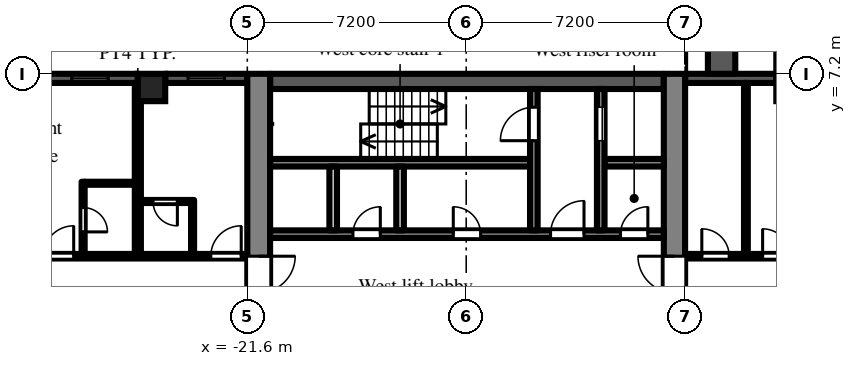
"""IFC4 building model, lengths in metres.
Left out: names, types, materials, properties, quantities, classifications, styles, units other than length and angle.
Written with IfcOpenShell. Run it as: python <this file> out.ifc"""

import sys

from ifc_helpers import new_model, si_unit, direction, frame, frame_2d, origin, origin_2d, place, context, subcontext, project, spatial, rectangle, extrude, element, fill, save


model = new_model("IFC4")
c1 = context("Model", 3, precision=1e-05, world=origin(), true_north=direction((0.0, 1.0)))
c2 = subcontext(c1, "Body", "Model", "MODEL_VIEW")
j1 = project(units=[si_unit("LENGTHUNIT", "METRE"), si_unit("PLANEANGLEUNIT", "RADIAN")], contexts=[c1])
p1 = place(None, origin())
s1 = spatial("IfcSite", under=j1, at=p1, CompositionType="ELEMENT")
p2 = place(p1, origin())
s2 = spatial("IfcBuilding", under=s1, at=p2, CompositionType="ELEMENT")
p3 = place(p2, frame((0.0, 0.0, 53.7)))
s3 = spatial("IfcBuildingStorey", under=s2, at=p3, CompositionType="ELEMENT", Elevation=53.7)
p4 = place(p3, frame((-24.75, 6.75, 0.0), z_axis=(0.0, 0.0, 1.0), x_axis=(1.0, 0.0, 0.0)))
e1 = element("IfcColumn", 1, at=p4, inside=s3, PredefinedType="COLUMN", context=c2, shape_type="SweptSolid", body=[
    extrude(rectangle(XDim=0.9, YDim=0.9, at=origin_2d()), origin(), (0.0, 0.0, 1.0), 3.0),
])
p5 = place(p3, frame((-4.05, 14.4, 0.0), z_axis=(0.0, 0.0, 1.0), x_axis=(0.0, -1.0, 0.0)))
e2 = element("IfcWall", 2, at=p5, inside=s3, PredefinedType="SOLIDWALL", context=c2, shape_type="SweptSolid", body=[
    extrude(rectangle(XDim=7.2, YDim=0.3, at=frame_2d((3.6, 0.0))), origin(), (0.0, 0.0, 1.0), 2.1),
])
p6 = place(p5, frame((3.0, 0.0, 0.0)))
e3 = element("IfcOpeningElement", 3, at=p6, cuts=e2, PredefinedType="OPENING", context=c2, shape_type="SweptSolid", body=[
    extrude(rectangle(XDim=1.2, YDim=2.05, at=frame_2d((0.6, 1.025))), frame((0.0, 0.16, 0.0), z_axis=(0.0, -1.0, 0.0), x_axis=(1.0, 0.0, 0.0)), (0.0, 0.0, 1.0), 0.32),
])
p7 = place(p5, frame((0.9, 0.0, 0.2)))
e4 = element("IfcOpeningElement", 4, at=p7, cuts=e2, PredefinedType="OPENING", context=c2, shape_type="SweptSolid", body=[
    extrude(rectangle(XDim=1.8, YDim=1.85, at=frame_2d((0.9, 0.925))), frame((0.0, 0.16, 0.0), z_axis=(0.0, -1.0, 0.0), x_axis=(1.0, 0.0, 0.0)), (0.0, 0.0, 1.0), 0.32),
])
p8 = place(p5, frame((4.5, 0.0, 0.2)))
e5 = element("IfcOpeningElement", 5, at=p8, cuts=e2, PredefinedType="OPENING", context=c2, shape_type="SweptSolid", body=[
    extrude(rectangle(XDim=1.8, YDim=1.85, at=frame_2d((0.9, 0.925))), frame((0.0, 0.16, 0.0), z_axis=(0.0, -1.0, 0.0), x_axis=(1.0, 0.0, 0.0)), (0.0, 0.0, 1.0), 0.32),
])
p9 = place(p3, frame((-4.2, 7.05, 0.0), z_axis=(0.0, 0.0, 1.0), x_axis=(-1.0, 0.0, 0.0)))
e6 = element("IfcWall", 6, at=p9, inside=s3, PredefinedType="SOLIDWALL", context=c2, shape_type="SweptSolid", body=[
    extrude(rectangle(XDim=3.0, YDim=0.3, at=frame_2d((1.5, 0.0))), origin(), (0.0, 0.0, 1.0), 2.1),
])
p10 = place(p3, frame((-21.6, 7.05, 0.0), z_axis=(0.0, 0.0, 1.0), x_axis=(-1.0, 0.0, 0.0)))
e7 = element("IfcWall", 7, at=p10, inside=s3, PredefinedType="SOLIDWALL", context=c2, shape_type="SweptSolid", body=[
    extrude(rectangle(XDim=2.7, YDim=0.3, at=frame_2d((1.35, 0.0))), origin(), (0.0, 0.0, 1.0), 2.1),
])
p11 = place(p10, frame((0.75, 0.0, 0.2)))
e8 = element("IfcOpeningElement", 8, at=p11, cuts=e7, PredefinedType="OPENING", context=c2, shape_type="SweptSolid", body=[
    extrude(rectangle(XDim=1.2, YDim=1.85, at=frame_2d((0.6, 0.925))), frame((0.0, 0.16, 0.0), z_axis=(0.0, -1.0, 0.0), x_axis=(1.0, 0.0, 0.0)), (0.0, 0.0, 1.0), 0.32),
])
p12 = place(p3, frame((-25.2, 7.05, 0.0), z_axis=(0.0, 0.0, 1.0), x_axis=(-1.0, 0.0, 0.0)))
e9 = element("IfcWall", 9, at=p12, inside=s3, PredefinedType="SOLIDWALL", context=c2, shape_type="SweptSolid", body=[
    extrude(rectangle(XDim=3.15, YDim=0.3, at=frame_2d((1.575, 0.0))), origin(), (0.0, 0.0, 1.0), 2.1),
])
p13 = place(p12, frame((0.975, 0.0, 0.2)))
e10 = element("IfcOpeningElement", 10, at=p13, cuts=e9, PredefinedType="OPENING", context=c2, shape_type="SweptSolid", body=[
    extrude(rectangle(XDim=1.2, YDim=1.85, at=frame_2d((0.6, 0.925))), frame((0.0, 0.16, 0.0), z_axis=(0.0, -1.0, 0.0), x_axis=(1.0, 0.0, 0.0)), (0.0, 0.0, 1.0), 0.32),
])
p14 = place(p3, frame((-6.0, 7.2, 0.0), z_axis=(0.0, 0.0, 1.0), x_axis=(0.0, 1.0, 0.0)))
e11 = element("IfcWall", 11, at=p14, inside=s3, PredefinedType="PARAPET", context=c2, shape_type="SweptSolid", body=[
    extrude(rectangle(XDim=7.2, YDim=0.9, at=frame_2d((3.6, 0.0))), origin(), (0.0, 0.0, 1.0), 0.8),
])
p15 = place(p3, frame((-7.55, -7.2, 0.0), z_axis=(0.0, 0.0, 1.0), x_axis=(0.0, 1.0, 0.0)))
e12 = element("IfcWall", 12, at=p15, inside=s3, PredefinedType="SHEAR", context=c2, shape_type="SweptSolid", body=[
    extrude(rectangle(XDim=14.4, YDim=0.7, at=frame_2d((7.2, 0.0))), origin(), (0.0, 0.0, 1.0), 2.575),
])
p16 = place(p15, frame((6.0, 0.0, 0.0)))
e13 = element("IfcOpeningElement", 13, at=p16, cuts=e12, PredefinedType="OPENING", context=c2, shape_type="SweptSolid", body=[
    extrude(rectangle(XDim=2.4, YDim=2.2, at=frame_2d((1.2, 1.1))), frame((0.0, 0.36, 0.0), z_axis=(0.0, -1.0, 0.0), x_axis=(1.0, 0.0, 0.0)), (0.0, 0.0, 1.0), 0.72),
])
p17 = place(p3, frame((-21.225, -7.2, 0.0), z_axis=(0.0, 0.0, 1.0), x_axis=(0.0, 1.0, 0.0)))
e14 = element("IfcWall", 14, at=p17, inside=s3, PredefinedType="SHEAR", context=c2, shape_type="SweptSolid", body=[
    extrude(rectangle(XDim=14.4, YDim=0.75, at=frame_2d((7.2, 0.0))), origin(), (0.0, 0.0, 1.0), 2.575),
])
p18 = place(p17, frame((6.0, 0.0, 0.0)))
e15 = element("IfcOpeningElement", 15, at=p18, cuts=e14, PredefinedType="OPENING", context=c2, shape_type="SweptSolid", body=[
    extrude(rectangle(XDim=2.4, YDim=2.2, at=frame_2d((1.2, 1.1))), frame((0.0, 0.385, 0.0), z_axis=(0.0, -1.0, 0.0), x_axis=(1.0, 0.0, 0.0)), (0.0, 0.0, 1.0), 0.77),
])
p19 = place(p3, frame((-7.9, 6.95, 0.0), z_axis=(0.0, 0.0, 1.0), x_axis=(-1.0, 0.0, 0.0)))
e16 = element("IfcWall", 16, at=p19, inside=s3, PredefinedType="SHEAR", context=c2, shape_type="SweptSolid", body=[
    extrude(rectangle(XDim=12.95, YDim=0.5, at=frame_2d((6.475, 0.0))), origin(), (0.0, 0.0, 1.0), 2.575),
])
p20 = place(p3, frame((-7.9, 1.925, 0.0), z_axis=(0.0, 0.0, 1.0), x_axis=(-1.0, 0.0, 0.0)))
e17 = element("IfcWall", 17, at=p20, inside=s3, PredefinedType="SHEAR", context=c2, shape_type="SweptSolid", body=[
    extrude(rectangle(XDim=12.95, YDim=0.25, at=frame_2d((6.475, 0.0))), origin(), (0.0, 0.0, 1.0), 2.575),
])
p21 = place(p20, frame((0.525, 0.0, 0.0)))
e18 = element("IfcOpeningElement", 18, at=p21, cuts=e17, PredefinedType="OPENING", context=c2, shape_type="SweptSolid", body=[
    extrude(rectangle(XDim=0.9, YDim=2.1, at=frame_2d((0.45, 1.05))), frame((0.0, 0.135, 0.0), z_axis=(0.0, -1.0, 0.0), x_axis=(1.0, 0.0, 0.0)), (0.0, 0.0, 1.0), 0.27),
])
p22 = place(p20, frame((2.625, 0.0, 0.0)))
e19 = element("IfcOpeningElement", 19, at=p22, cuts=e17, PredefinedType="OPENING", context=c2, shape_type="SweptSolid", body=[
    extrude(rectangle(XDim=1.1, YDim=2.1, at=frame_2d((0.55, 1.05))), frame((0.0, 0.135, 0.0), z_axis=(0.0, -1.0, 0.0), x_axis=(1.0, 0.0, 0.0)), (0.0, 0.0, 1.0), 0.27),
])
p23 = place(p20, frame((6.025, 0.0, 0.0)))
e20 = element("IfcOpeningElement", 20, at=p23, cuts=e17, PredefinedType="OPENING", context=c2, shape_type="SweptSolid", body=[
    extrude(rectangle(XDim=0.9, YDim=2.1, at=frame_2d((0.45, 1.05))), frame((0.0, 0.135, 0.0), z_axis=(0.0, -1.0, 0.0), x_axis=(1.0, 0.0, 0.0)), (0.0, 0.0, 1.0), 0.27),
])
p24 = place(p20, frame((9.325, 0.0, 0.0)))
e21 = element("IfcOpeningElement", 21, at=p24, cuts=e17, PredefinedType="OPENING", context=c2, shape_type="SweptSolid", body=[
    extrude(rectangle(XDim=0.9, YDim=2.1, at=frame_2d((0.45, 1.05))), frame((0.0, 0.135, 0.0), z_axis=(0.0, -1.0, 0.0), x_axis=(1.0, 0.0, 0.0)), (0.0, 0.0, 1.0), 0.27),
])
p25 = place(p3, frame((-7.9, 4.275, 0.0), z_axis=(0.0, 0.0, 1.0), x_axis=(-1.0, 0.0, 0.0)))
e22 = element("IfcWall", 22, at=p25, inside=s3, PredefinedType="SHEAR", context=c2, shape_type="SweptSolid", body=[
    extrude(rectangle(XDim=1.95, YDim=0.25, at=frame_2d((0.975, 0.0))), origin(), (0.0, 0.0, 1.0), 2.575),
])
p26 = place(p3, frame((-12.3, 4.275, 0.0), z_axis=(0.0, 0.0, 1.0), x_axis=(-1.0, 0.0, 0.0)))
e23 = element("IfcWall", 23, at=p26, inside=s3, PredefinedType="SHEAR", context=c2, shape_type="SweptSolid", body=[
    extrude(rectangle(XDim=8.55, YDim=0.25, at=frame_2d((4.275, 0.0))), origin(), (0.0, 0.0, 1.0), 2.575),
])
p27 = place(p3, frame((-9.975, 2.05, 0.0), z_axis=(0.0, 0.0, 1.0), x_axis=(0.0, 1.0, 0.0)))
e24 = element("IfcWall", 24, at=p27, inside=s3, PredefinedType="SHEAR", context=c2, shape_type="SweptSolid", body=[
    extrude(rectangle(XDim=4.65, YDim=0.25, at=frame_2d((2.325, 0.0))), origin(), (0.0, 0.0, 1.0), 2.575),
])
p28 = place(p27, frame((2.95, 0.0, 0.0)))
e25 = element("IfcOpeningElement", 25, at=p28, cuts=e24, PredefinedType="OPENING", context=c2, shape_type="SweptSolid", body=[
    extrude(rectangle(XDim=1.1, YDim=2.1, at=frame_2d((0.55, 1.05))), frame((0.0, 0.135, 0.0), z_axis=(0.0, -1.0, 0.0), x_axis=(1.0, 0.0, 0.0)), (0.0, 0.0, 1.0), 0.27),
])
p29 = place(p3, frame((-12.175, 2.05, 0.0), z_axis=(0.0, 0.0, 1.0), x_axis=(0.0, 1.0, 0.0)))
e26 = element("IfcWall", 26, at=p29, inside=s3, PredefinedType="SHEAR", context=c2, shape_type="SweptSolid", body=[
    extrude(rectangle(XDim=4.65, YDim=0.25, at=frame_2d((2.325, 0.0))), origin(), (0.0, 0.0, 1.0), 2.575),
])
p30 = place(p29, frame((2.95, 0.0, 0.0)))
e27 = element("IfcOpeningElement", 27, at=p30, cuts=e26, PredefinedType="OPENING", context=c2, shape_type="SweptSolid", body=[
    extrude(rectangle(XDim=1.1, YDim=2.1, at=frame_2d((0.55, 1.05))), frame((0.0, 0.135, 0.0), z_axis=(0.0, -1.0, 0.0), x_axis=(1.0, 0.0, 0.0)), (0.0, 0.0, 1.0), 0.27),
])
for number, where, z_axis, x_axis in (
    (28, (-16.575, 2.05, 0.0), (0.0, 0.0, 1.0), (0.0, 1.0, 0.0)),
    (29, (-18.775, 2.05, 0.0), (0.0, 0.0, 1.0), (0.0, 1.0, 0.0)),
):
    element("IfcWall", number, at=place(p3, frame(where, z_axis=z_axis, x_axis=x_axis)), inside=s3, PredefinedType="PARTITIONING", context=c2, shape_type="SweptSolid", body=[
        extrude(rectangle(XDim=2.1, YDim=0.25, at=frame_2d((1.05, 0.0))), origin(), (0.0, 0.0, 1.0), 2.575),
    ])
p31 = place(p3, frame((-36.5, 1.2, 0.0), z_axis=(0.0, 0.0, 1.0), x_axis=(1.0, 0.0, 0.0)))
e30 = element("IfcWall", 30, at=p31, inside=s3, PredefinedType="PARTITIONING", context=c2, shape_type="SweptSolid", body=[
    extrude(rectangle(XDim=14.9, YDim=0.15, at=frame_2d((7.45, 0.0))), origin(), (0.0, 0.0, 1.0), 2.575),
])
p32 = place(p31, frame((13.7, 0.0, 0.0)))
e31 = element("IfcOpeningElement", 31, at=p32, cuts=e30, PredefinedType="OPENING", context=c2, shape_type="SweptSolid", body=[
    extrude(rectangle(XDim=1.0, YDim=2.1, at=frame_2d((0.5, 1.05))), frame((0.0, 0.085, 0.0), z_axis=(0.0, -1.0, 0.0), x_axis=(1.0, 0.0, 0.0)), (0.0, 0.0, 1.0), 0.17),
])
p33 = place(p31, frame((8.19, 0.0, 0.0)))
e32 = element("IfcOpeningElement", 32, at=p33, cuts=e30, PredefinedType="OPENING", context=c2, shape_type="SweptSolid", body=[
    extrude(rectangle(XDim=1.0, YDim=2.1, at=frame_2d((0.5, 1.05))), frame((0.0, 0.085, 0.0), z_axis=(0.0, -1.0, 0.0), x_axis=(1.0, 0.0, 0.0)), (0.0, 0.0, 1.0), 0.17),
])
p34 = place(p31, frame((1.15, 0.0, 0.0)))
e33 = element("IfcOpeningElement", 33, at=p34, cuts=e30, PredefinedType="OPENING", context=c2, shape_type="SweptSolid", body=[
    extrude(rectangle(XDim=1.8, YDim=2.1, at=frame_2d((0.9, 1.05))), frame((0.0, 0.085, 0.0), z_axis=(0.0, -1.0, 0.0), x_axis=(1.0, 0.0, 0.0)), (0.0, 0.0, 1.0), 0.17),
])
p35 = place(p3, frame((-27.0, 1.275, 0.0), z_axis=(0.0, 0.0, 1.0), x_axis=(0.0, 1.0, 0.0)))
e34 = element("IfcWall", 34, at=p35, inside=s3, PredefinedType="PARTITIONING", context=c2, shape_type="SweptSolid", body=[
    extrude(rectangle(XDim=2.375, YDim=0.1, at=frame_2d((1.188, 0.0))), origin(), (0.0, 0.0, 1.0), 2.575),
])
p36 = place(p35, frame((0.725, 0.0, 0.0)))
e35 = element("IfcOpeningElement", 35, at=p36, cuts=e34, PredefinedType="OPENING", context=c2, shape_type="SweptSolid", body=[
    extrude(rectangle(XDim=0.8, YDim=2.1, at=frame_2d((0.4, 1.05))), frame((0.0, 0.06, 0.0), z_axis=(0.0, -1.0, 0.0), x_axis=(1.0, 0.0, 0.0)), (0.0, 0.0, 1.0), 0.12),
])
p37 = place(p3, frame((-26.95, 3.6, 0.0), z_axis=(0.0, 0.0, 1.0), x_axis=(1.0, 0.0, 0.0)))
e36 = element("IfcWall", 36, at=p37, inside=s3, PredefinedType="PARTITIONING", context=c2, shape_type="SweptSolid", body=[
    extrude(rectangle(XDim=1.65, YDim=0.1, at=frame_2d((0.825, 0.0))), origin(), (0.0, 0.0, 1.0), 2.575),
])
p38 = place(p3, frame((-25.2, 1.275, 0.0), z_axis=(0.0, 0.0, 1.0), x_axis=(0.0, 1.0, 0.0)))
e37 = element("IfcWall", 37, at=p38, inside=s3, PredefinedType="PARTITIONING", context=c2, shape_type="SweptSolid", body=[
    extrude(rectangle(XDim=5.625, YDim=0.2, at=frame_2d((2.812, 0.0))), origin(), (0.0, 0.0, 1.0), 2.575),
])
p39 = place(p3, frame((-25.1, 3.0, 0.0), z_axis=(0.0, 0.0, 1.0), x_axis=(1.0, 0.0, 0.0)))
e38 = element("IfcWall", 38, at=p39, inside=s3, PredefinedType="PARTITIONING", context=c2, shape_type="SweptSolid", body=[
    extrude(rectangle(XDim=1.75, YDim=0.1, at=frame_2d((0.875, 0.0))), origin(), (0.0, 0.0, 1.0), 2.575),
])
p40 = place(p39, frame((0.4, 0.0, 0.0)))
e39 = element("IfcOpeningElement", 39, at=p40, cuts=e38, PredefinedType="OPENING", context=c2, shape_type="SweptSolid", body=[
    extrude(rectangle(XDim=0.8, YDim=2.1, at=frame_2d((0.4, 1.05))), frame((0.0, 0.06, 0.0), z_axis=(0.0, -1.0, 0.0), x_axis=(1.0, 0.0, 0.0)), (0.0, 0.0, 1.0), 0.12),
])
p41 = place(p3, frame((-23.4, 1.275, 0.0), z_axis=(0.0, 0.0, 1.0), x_axis=(0.0, 1.0, 0.0)))
e40 = element("IfcWall", 40, at=p41, inside=s3, PredefinedType="PARTITIONING", context=c2, shape_type="SweptSolid", body=[
    extrude(rectangle(XDim=1.675, YDim=0.1, at=frame_2d((0.837, 0.0))), origin(), (0.0, 0.0, 1.0), 2.575),
])
p42 = place(p3, frame((-7.2, 1.2, 0.0), z_axis=(0.0, 0.0, 1.0), x_axis=(1.0, 0.0, 0.0)))
e41 = element("IfcWall", 41, at=p42, inside=s3, PredefinedType="PARTITIONING", context=c2, shape_type="SweptSolid", body=[
    extrude(rectangle(XDim=6.075, YDim=0.15, at=frame_2d((3.038, 0.0))), origin(), (0.0, 0.0, 1.0), 2.575),
])
p43 = place(p42, frame((2.55, 0.0, 0.0)))
e42 = element("IfcOpeningElement", 42, at=p43, cuts=e41, PredefinedType="OPENING", context=c2, shape_type="SweptSolid", body=[
    extrude(rectangle(XDim=0.9, YDim=2.1, at=frame_2d((0.45, 1.05))), frame((0.0, 0.085, 0.0), z_axis=(0.0, -1.0, 0.0), x_axis=(1.0, 0.0, 0.0)), (0.0, 0.0, 1.0), 0.17),
])
p44 = place(p42, frame((0.55, 0.0, 0.0)))
e43 = element("IfcOpeningElement", 43, at=p44, cuts=e41, PredefinedType="OPENING", context=c2, shape_type="SweptSolid", body=[
    extrude(rectangle(XDim=0.9, YDim=2.1, at=frame_2d((0.45, 1.05))), frame((0.0, 0.085, 0.0), z_axis=(0.0, -1.0, 0.0), x_axis=(1.0, 0.0, 0.0)), (0.0, 0.0, 1.0), 0.17),
])
p45 = place(p3, frame((-5.2, 1.275, 0.0), z_axis=(0.0, 0.0, 1.0), x_axis=(0.0, 1.0, 0.0)))
e44 = element("IfcWall", 44, at=p45, inside=s3, PredefinedType="PARTITIONING", context=c2, shape_type="SweptSolid", body=[
    extrude(rectangle(XDim=5.625, YDim=0.125, at=frame_2d((2.812, 0.0))), origin(), (0.0, 0.0, 1.0), 2.575),
])
p46 = place(p11, origin())
e45 = element("IfcWindow", 45, at=p46, inside=s3, PartitioningType="SINGLE_PANEL", PredefinedType="WINDOW", context=c2, shape_type="SweptSolid", body=[
    extrude(rectangle(XDim=1.2, YDim=1.85, at=frame_2d((0.6, 0.925))), frame((0.0, 0.03, 0.0), z_axis=(0.0, -1.0, 0.0), x_axis=(1.0, 0.0, 0.0)), (0.0, 0.0, 1.0), 0.06),
])
fill(e8, e45)
p47 = place(p13, origin())
e46 = element("IfcWindow", 46, at=p47, inside=s3, PartitioningType="SINGLE_PANEL", PredefinedType="WINDOW", context=c2, shape_type="SweptSolid", body=[
    extrude(rectangle(XDim=1.2, YDim=1.85, at=frame_2d((0.6, 0.925))), frame((0.0, 0.03, 0.0), z_axis=(0.0, -1.0, 0.0), x_axis=(1.0, 0.0, 0.0)), (0.0, 0.0, 1.0), 0.06),
])
fill(e10, e46)
p48 = place(p28, origin())
e47 = element("IfcDoor", 47, at=p48, inside=s3, OperationType="SLIDING_TO_LEFT", PredefinedType="DOOR", context=c2, shape_type="SweptSolid", body=[
    extrude(rectangle(XDim=1.1, YDim=2.1, at=frame_2d((0.55, 1.05))), frame((0.0, 0.025, 0.0), z_axis=(0.0, -1.0, 0.0), x_axis=(1.0, 0.0, 0.0)), (0.0, 0.0, 1.0), 0.05),
])
fill(e25, e47)
p49 = place(p30, origin())
e48 = element("IfcDoor", 48, at=p49, inside=s3, OperationType="SINGLE_SWING_LEFT", PredefinedType="DOOR", context=c2, shape_type="SweptSolid", body=[
    extrude(rectangle(XDim=1.1, YDim=2.1, at=frame_2d((0.55, 1.05))), frame((0.0, 0.025, 0.0), z_axis=(0.0, -1.0, 0.0), x_axis=(1.0, 0.0, 0.0)), (0.0, 0.0, 1.0), 0.05),
])
fill(e27, e48)
p50 = place(p21, frame((0.9, 0.0, 0.0), z_axis=(0.0, 0.0, 1.0), x_axis=(-1.0, 0.0, 0.0)))
e49 = element("IfcDoor", 49, at=p50, inside=s3, OperationType="SINGLE_SWING_RIGHT", PredefinedType="DOOR", context=c2, shape_type="SweptSolid", body=[
    extrude(rectangle(XDim=0.9, YDim=2.1, at=frame_2d((0.45, 1.05))), frame((0.0, 0.025, 0.0), z_axis=(0.0, -1.0, 0.0), x_axis=(1.0, 0.0, 0.0)), (0.0, 0.0, 1.0), 0.05),
])
fill(e18, e49)
p51 = place(p22, frame((1.1, 0.0, 0.0), z_axis=(0.0, 0.0, 1.0), x_axis=(-1.0, 0.0, 0.0)))
e50 = element("IfcDoor", 50, at=p51, inside=s3, OperationType="SINGLE_SWING_RIGHT", PredefinedType="DOOR", context=c2, shape_type="SweptSolid", body=[
    extrude(rectangle(XDim=1.1, YDim=2.1, at=frame_2d((0.55, 1.05))), frame((0.0, 0.025, 0.0), z_axis=(0.0, -1.0, 0.0), x_axis=(1.0, 0.0, 0.0)), (0.0, 0.0, 1.0), 0.05),
])
fill(e19, e50)
p52 = place(p16, origin())
e51 = element("IfcDoor", 51, at=p52, inside=s3, OperationType="DOUBLE_DOOR_DOUBLE_SWING", PredefinedType="DOOR", context=c2, shape_type="SweptSolid", body=[
    extrude(rectangle(XDim=2.4, YDim=2.2, at=frame_2d((1.2, 1.1))), frame((0.0, 0.025, 0.0), z_axis=(0.0, -1.0, 0.0), x_axis=(1.0, 0.0, 0.0)), (0.0, 0.0, 1.0), 0.05),
])
fill(e13, e51)
p53 = place(p18, frame((2.4, 0.0, 0.0), z_axis=(0.0, 0.0, 1.0), x_axis=(-1.0, 0.0, 0.0)))
e52 = element("IfcDoor", 52, at=p53, inside=s3, OperationType="DOUBLE_DOOR_DOUBLE_SWING", PredefinedType="DOOR", context=c2, shape_type="SweptSolid", body=[
    extrude(rectangle(XDim=2.4, YDim=2.2, at=frame_2d((1.2, 1.1))), frame((0.0, 0.025, 0.0), z_axis=(0.0, -1.0, 0.0), x_axis=(1.0, 0.0, 0.0)), (0.0, 0.0, 1.0), 0.05),
])
fill(e15, e52)
p54 = place(p23, frame((0.9, 0.0, 0.0), z_axis=(0.0, 0.0, 1.0), x_axis=(-1.0, 0.0, 0.0)))
e53 = element("IfcDoor", 53, at=p54, inside=s3, OperationType="SINGLE_SWING_LEFT", PredefinedType="DOOR", context=c2, shape_type="SweptSolid", body=[
    extrude(rectangle(XDim=0.9, YDim=2.1, at=frame_2d((0.45, 1.05))), frame((0.0, 0.025, 0.0), z_axis=(0.0, -1.0, 0.0), x_axis=(1.0, 0.0, 0.0)), (0.0, 0.0, 1.0), 0.05),
])
fill(e20, e53)
p55 = place(p24, frame((0.9, 0.0, 0.0), z_axis=(0.0, 0.0, 1.0), x_axis=(-1.0, 0.0, 0.0)))
e54 = element("IfcDoor", 54, at=p55, inside=s3, OperationType="SINGLE_SWING_RIGHT", PredefinedType="DOOR", context=c2, shape_type="SweptSolid", body=[
    extrude(rectangle(XDim=0.9, YDim=2.1, at=frame_2d((0.45, 1.05))), frame((0.0, 0.025, 0.0), z_axis=(0.0, -1.0, 0.0), x_axis=(1.0, 0.0, 0.0)), (0.0, 0.0, 1.0), 0.05),
])
fill(e21, e54)
p56 = place(p43, origin())
e55 = element("IfcDoor", 55, at=p56, inside=s3, OperationType="SINGLE_SWING_LEFT", PredefinedType="DOOR", context=c2, shape_type="SweptSolid", body=[
    extrude(rectangle(XDim=0.9, YDim=2.1, at=frame_2d((0.45, 1.05))), frame((0.0, 0.025, 0.0), z_axis=(0.0, -1.0, 0.0), x_axis=(1.0, 0.0, 0.0)), (0.0, 0.0, 1.0), 0.05),
])
fill(e42, e55)
p57 = place(p44, origin())
e56 = element("IfcDoor", 56, at=p57, inside=s3, OperationType="SINGLE_SWING_LEFT", PredefinedType="DOOR", context=c2, shape_type="SweptSolid", body=[
    extrude(rectangle(XDim=0.9, YDim=2.1, at=frame_2d((0.45, 1.05))), frame((0.0, 0.025, 0.0), z_axis=(0.0, -1.0, 0.0), x_axis=(1.0, 0.0, 0.0)), (0.0, 0.0, 1.0), 0.05),
])
fill(e43, e56)
p58 = place(p40, frame((0.8, 0.0, 0.0), z_axis=(0.0, 0.0, 1.0), x_axis=(-1.0, 0.0, 0.0)))
e57 = element("IfcDoor", 57, at=p58, inside=s3, OperationType="SINGLE_SWING_LEFT", PredefinedType="DOOR", context=c2, shape_type="SweptSolid", body=[
    extrude(rectangle(XDim=0.8, YDim=2.1, at=frame_2d((0.4, 1.05))), frame((0.0, 0.025, 0.0), z_axis=(0.0, -1.0, 0.0), x_axis=(1.0, 0.0, 0.0)), (0.0, 0.0, 1.0), 0.05),
])
fill(e39, e57)
p59 = place(p32, origin())
e58 = element("IfcDoor", 58, at=p59, inside=s3, OperationType="SINGLE_SWING_RIGHT", PredefinedType="DOOR", context=c2, shape_type="SweptSolid", body=[
    extrude(rectangle(XDim=1.0, YDim=2.1, at=frame_2d((0.5, 1.05))), frame((0.0, 0.025, 0.0), z_axis=(0.0, -1.0, 0.0), x_axis=(1.0, 0.0, 0.0)), (0.0, 0.0, 1.0), 0.05),
])
fill(e31, e58)
p60 = place(p36, frame((0.8, 0.0, 0.0), z_axis=(0.0, 0.0, 1.0), x_axis=(-1.0, 0.0, 0.0)))
e59 = element("IfcDoor", 59, at=p60, inside=s3, OperationType="SINGLE_SWING_RIGHT", PredefinedType="DOOR", context=c2, shape_type="SweptSolid", body=[
    extrude(rectangle(XDim=0.8, YDim=2.1, at=frame_2d((0.4, 1.05))), frame((0.0, 0.025, 0.0), z_axis=(0.0, -1.0, 0.0), x_axis=(1.0, 0.0, 0.0)), (0.0, 0.0, 1.0), 0.05),
])
fill(e35, e59)
p61 = place(p33, origin())
e60 = element("IfcDoor", 60, at=p61, inside=s3, OperationType="SINGLE_SWING_RIGHT", PredefinedType="DOOR", context=c2, shape_type="SweptSolid", body=[
    extrude(rectangle(XDim=1.0, YDim=2.1, at=frame_2d((0.5, 1.05))), frame((0.0, 0.025, 0.0), z_axis=(0.0, -1.0, 0.0), x_axis=(1.0, 0.0, 0.0)), (0.0, 0.0, 1.0), 0.05),
])
fill(e32, e60)
save(model, sys.argv[1])
